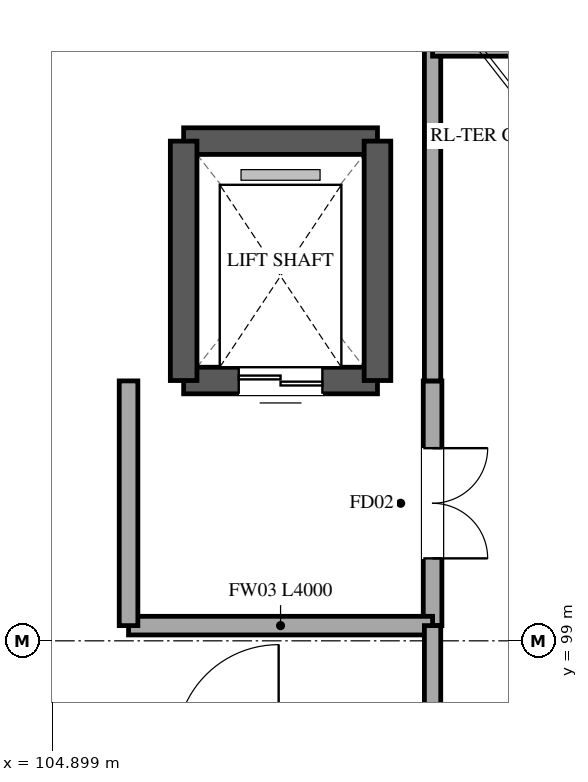
"""IFC4 building model, lengths in metres.
Left out: names, types, materials, properties, quantities, classifications, styles, units other than length and angle.
Written with IfcOpenShell. Run it as: python <this file> out.ifc"""

import sys

from ifc_helpers import new_model, si_unit, direction, frame, frame_2d, origin, place, context, subcontext, project, spatial, rectangle, extrude, element, fill, save


model = new_model("IFC4")
c1 = context("Model", 3, precision=1e-05, world=origin(), true_north=direction((0.0, 1.0)))
c2 = subcontext(c1, "Body", "Model", "MODEL_VIEW")
j1 = project(units=[si_unit("LENGTHUNIT", "METRE"), si_unit("PLANEANGLEUNIT", "RADIAN")], contexts=[c1])
p1 = place(None, origin())
s1 = spatial("IfcSite", under=j1, at=p1, CompositionType="ELEMENT")
p2 = place(p1, origin())
s2 = spatial("IfcBuilding", under=s1, at=p2, CompositionType="ELEMENT")
p3 = place(p2, frame((0.0, 0.0, 16.5)))
s3 = spatial("IfcBuildingStorey", under=s2, at=p3, CompositionType="ELEMENT", Elevation=16.5)
p4 = place(p3, frame((106.625, 105.575, 0.0), z_axis=(0.0, 0.0, 1.0), x_axis=(1.0, 0.0, 0.0)))
e1 = element("IfcWall", 1, at=p4, inside=s3, PredefinedType="SHEAR", context=c2, shape_type="SweptSolid", body=[
    extrude(rectangle(XDim=2.55, YDim=0.35, at=frame_2d((1.275, 0.0))), origin(), (0.0, 0.0, 1.0), 5.1),
])
p5 = place(p3, frame((109.175, 102.425, 0.0), z_axis=(0.0, 0.0, 1.0), x_axis=(-1.0, 0.0, 0.0)))
e2 = element("IfcWall", 2, at=p5, inside=s3, PredefinedType="SHEAR", context=c2, shape_type="SweptSolid", body=[
    extrude(rectangle(XDim=2.55, YDim=0.35, at=frame_2d((1.275, 0.0))), origin(), (0.0, 0.0, 1.0), 5.1),
])
p6 = place(p5, frame((0.725, 0.0, 0.0)))
e3 = element("IfcOpeningElement", 3, at=p6, cuts=e2, PredefinedType="OPENING", context=c2, shape_type="SweptSolid", body=[
    extrude(rectangle(XDim=1.1, YDim=2.2, at=frame_2d((0.55, 1.1))), frame((0.0, 0.185, 0.0), z_axis=(0.0, -1.0, 0.0), x_axis=(1.0, 0.0, 0.0)), (0.0, 0.0, 1.0), 0.37),
])
for number, where, z_axis, x_axis in (
    (4, (106.625, 102.425, 0.0), (0.0, 0.0, 1.0), (0.0, 1.0, 0.0)),
    (5, (109.175, 105.575, 0.0), (0.0, 0.0, 1.0), (0.0, -1.0, 0.0)),
):
    element("IfcWall", number, at=place(p3, frame(where, z_axis=z_axis, x_axis=x_axis)), inside=s3, PredefinedType="SHEAR", context=c2, shape_type="SweptSolid", body=[
        extrude(rectangle(XDim=3.15, YDim=0.35, at=frame_2d((1.575, 0.0))), origin(), (0.0, 0.0, 1.0), 5.1),
    ])
p7 = place(p3, frame((109.9, 102.42, 0.0), z_axis=(0.0, 0.0, 1.0), x_axis=(0.0, -1.0, 0.0)))
e6 = element("IfcWall", 6, at=p7, inside=s3, PredefinedType="STANDARD", context=c2, shape_type="SweptSolid", body=[
    extrude(rectangle(XDim=3.22, YDim=0.245, at=frame_2d((1.61, 0.0))), origin(), (0.0, 0.0, 1.0), 4.075),
])
p8 = place(p7, frame((0.885, 0.0, 0.0)))
e7 = element("IfcOpeningElement", 7, at=p8, cuts=e6, PredefinedType="OPENING", context=c2, shape_type="SweptSolid", body=[
    extrude(rectangle(XDim=1.45, YDim=2.2, at=frame_2d((0.725, 1.1))), frame((0.0, 0.133, 0.0), z_axis=(0.0, -1.0, 0.0), x_axis=(1.0, 0.0, 0.0)), (0.0, 0.0, 1.0), 0.265),
])
p9 = place(p3, frame((109.9, 99.2, 0.0), z_axis=(0.0, 0.0, 1.0), x_axis=(-1.0, 0.0, 0.0)))
e8 = element("IfcWall", 8, at=p9, inside=s3, PredefinedType="STANDARD", context=c2, shape_type="SweptSolid", body=[
    extrude(rectangle(XDim=4.0, YDim=0.245, at=frame_2d((2.0, 0.0))), origin(), (0.0, 0.0, 1.0), 4.075),
])
p10 = place(p3, frame((105.9, 99.2, 0.0), z_axis=(0.0, 0.0, 1.0), x_axis=(0.0, 1.0, 0.0)))
e9 = element("IfcWall", 9, at=p10, inside=s3, PredefinedType="STANDARD", context=c2, shape_type="SweptSolid", body=[
    extrude(rectangle(XDim=3.22, YDim=0.245, at=frame_2d((1.61, 0.0))), origin(), (0.0, 0.0, 1.0), 4.075),
])
p11 = place(p3, frame((109.9, 97.6, 0.0), z_axis=(0.0, 0.0, 1.0), x_axis=(0.0, 1.0, 0.0)))
e10 = element("IfcWall", 10, at=p11, inside=s3, PredefinedType="PARTITIONING", context=c2, shape_type="SweptSolid", body=[
    extrude(rectangle(XDim=1.6, YDim=0.215, at=frame_2d((0.8, 0.0))), origin(), (0.0, 0.0, 1.0), 4.075),
])
p12 = place(p3, frame((109.9, 102.42, 0.0), z_axis=(0.0, 0.0, 1.0), x_axis=(0.0, 1.0, 0.0)))
e11 = element("IfcWall", 11, at=p12, inside=s3, PredefinedType="PARTITIONING", context=c2, shape_type="SweptSolid", body=[
    extrude(rectangle(XDim=4.38, YDim=0.215, at=frame_2d((2.19, 0.0))), origin(), (0.0, 0.0, 1.0), 4.075),
])
p13 = place(p3, frame((109.9, 106.8, 0.0), z_axis=(0.0, 0.0, 1.0), x_axis=(1.0, 0.0, 0.0)))
e12 = element("IfcWall", 12, at=p13, inside=s3, PredefinedType="PARTITIONING", context=c2, shape_type="SweptSolid", body=[
    extrude(rectangle(XDim=2.79, YDim=0.215, at=frame_2d((1.395, 0.0))), origin(), (0.0, 0.0, 1.0), 4.075),
])
p14 = place(p6, origin())
e13 = element("IfcDoor", 13, at=p14, inside=s3, OperationType="DOUBLE_DOOR_SLIDING", PredefinedType="DOOR", context=c2, shape_type="SweptSolid", body=[
    extrude(rectangle(XDim=1.1, YDim=2.2, at=frame_2d((0.55, 1.1))), frame((0.0, 0.025, 0.0), z_axis=(0.0, -1.0, 0.0), x_axis=(1.0, 0.0, 0.0)), (0.0, 0.0, 1.0), 0.05),
])
fill(e3, e13)
p15 = place(p8, origin())
e14 = element("IfcDoor", 14, at=p15, inside=s3, OperationType="DOUBLE_DOOR_SINGLE_SWING", PredefinedType="DOOR", context=c2, shape_type="SweptSolid", body=[
    extrude(rectangle(XDim=1.45, YDim=2.2, at=frame_2d((0.725, 1.1))), frame((0.0, 0.025, 0.0), z_axis=(0.0, -1.0, 0.0), x_axis=(1.0, 0.0, 0.0)), (0.0, 0.0, 1.0), 0.05),
])
fill(e7, e14)
save(model, sys.argv[1])
